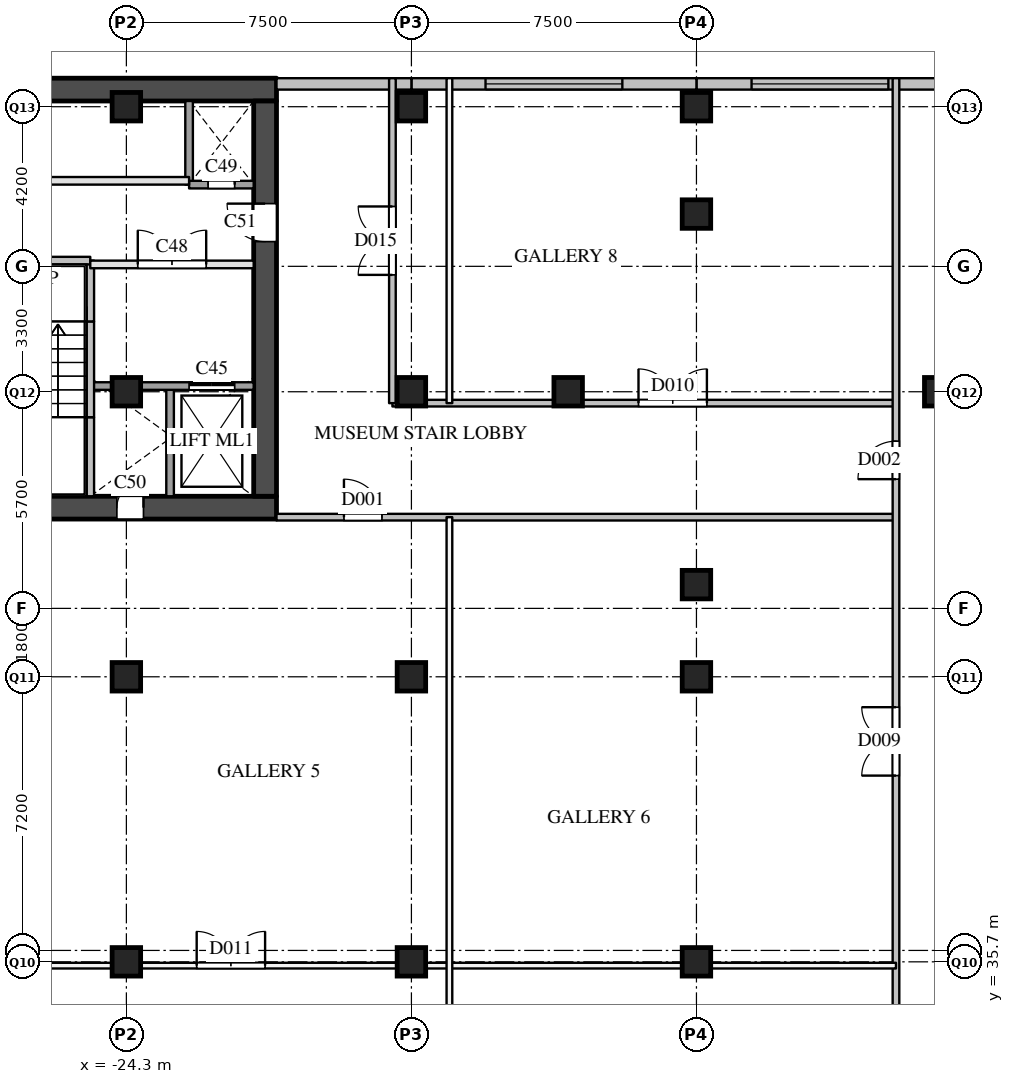
"""IFC4 building model, lengths in metres.
Left out: names, types, materials, properties, quantities, classifications, styles, units other than length and angle.
Written with IfcOpenShell. Run it as: python <this file> out.ifc"""

import sys

from ifc_helpers import new_model, si_unit, direction, frame, frame_2d, origin, origin_2d, place, context, subcontext, project, spatial, rectangle, extrude, element, fill, save


model = new_model("IFC4")
c1 = context("Model", 3, precision=1e-05, world=origin(), true_north=direction((0.0, 1.0)))
c2 = subcontext(c1, "Body", "Model", "MODEL_VIEW")
j1 = project(units=[si_unit("LENGTHUNIT", "METRE"), si_unit("PLANEANGLEUNIT", "RADIAN")], contexts=[c1])
p1 = place(None, origin())
s1 = spatial("IfcSite", under=j1, at=p1, CompositionType="ELEMENT")
p2 = place(p1, origin())
s2 = spatial("IfcBuilding", under=s1, at=p2, CompositionType="ELEMENT")
p3 = place(p2, frame((0.0, 0.0, 21.0)))
s3 = spatial("IfcBuildingStorey", under=s2, at=p3, CompositionType="ELEMENT", Elevation=21.0)
for number, where, z_axis, x_axis in (
    (1, (-24.3, 35.7, 0.0), (0.0, 0.0, 1.0), (1.0, 0.0, 0.0)),
    (2, (-24.3, 43.2, 0.0), (0.0, 0.0, 1.0), (1.0, 0.0, 0.0)),
    (3, (-24.3, 50.7, 0.0), (0.0, 0.0, 1.0), (1.0, 0.0, 0.0)),
    (4, (-24.3, 58.2, 0.0), (0.0, 0.0, 1.0), (1.0, 0.0, 0.0)),
    (5, (-16.8, 35.7, 0.0), (0.0, 0.0, 1.0), (1.0, 0.0, 0.0)),
    (6, (-16.8, 43.2, 0.0), (0.0, 0.0, 1.0), (1.0, 0.0, 0.0)),
    (7, (-16.8, 50.7, 0.0), (0.0, 0.0, 1.0), (1.0, 0.0, 0.0)),
    (8, (-16.8, 58.2, 0.0), (0.0, 0.0, 1.0), (1.0, 0.0, 0.0)),
    (9, (-9.3, 35.7, 0.0), (0.0, 0.0, 1.0), (1.0, 0.0, 0.0)),
    (10, (-9.3, 43.2, 0.0), (0.0, 0.0, 1.0), (1.0, 0.0, 0.0)),
    (11, (-9.3, 58.2, 0.0), (0.0, 0.0, 1.0), (1.0, 0.0, 0.0)),
    (12, (-12.675, 50.7, 0.0), (0.0, 0.0, 1.0), (1.0, 0.0, 0.0)),
    (13, (-9.3, 45.625, 0.0), (0.0, 0.0, 1.0), (1.0, 0.0, 0.0)),
    (14, (-9.3, 55.375, 0.0), (0.0, 0.0, 1.0), (1.0, 0.0, 0.0)),
    (15, (-2.925, 50.7, 0.0), (0.0, 0.0, 1.0), (1.0, 0.0, 0.0)),
):
    element("IfcColumn", number, at=place(p3, frame(where, z_axis=z_axis, x_axis=x_axis)), inside=s3, PredefinedType="COLUMN", context=c2, shape_type="SweptSolid", body=[
        extrude(rectangle(XDim=0.75, YDim=0.75, at=origin_2d()), origin(), (0.0, 0.0, 1.0), 5.0),
    ])
p4 = place(p3, frame((-1.8, 58.8, 0.0), z_axis=(0.0, 0.0, 1.0), x_axis=(-1.0, 0.0, 0.0)))
e16 = element("IfcWall", 16, at=p4, inside=s3, PredefinedType="SOLIDWALL", context=c2, shape_type="SweptSolid", body=[
    extrude(rectangle(XDim=7.5, YDim=0.3, at=frame_2d((3.75, 0.0))), origin(), (0.0, 0.0, 1.0), 4.59),
])
p5 = place(p4, frame((2.45, 0.0, 2.4)))
e17 = element("IfcOpeningElement", 17, at=p5, cuts=e16, PredefinedType="OPENING", context=c2, shape_type="SweptSolid", body=[
    extrude(rectangle(XDim=3.6, YDim=1.2, at=frame_2d((1.8, 0.6))), frame((0.0, 0.16, 0.0), z_axis=(0.0, -1.0, 0.0), x_axis=(1.0, 0.0, 0.0)), (0.0, 0.0, 1.0), 0.32),
])
p6 = place(p3, frame((-9.3, 58.8, 0.0), z_axis=(0.0, 0.0, 1.0), x_axis=(-1.0, 0.0, 0.0)))
e18 = element("IfcWall", 18, at=p6, inside=s3, PredefinedType="SOLIDWALL", context=c2, shape_type="SweptSolid", body=[
    extrude(rectangle(XDim=7.5, YDim=0.3, at=frame_2d((3.75, 0.0))), origin(), (0.0, 0.0, 1.0), 4.59),
])
p7 = place(p6, frame((1.95, 0.0, 2.4)))
e19 = element("IfcOpeningElement", 19, at=p7, cuts=e18, PredefinedType="OPENING", context=c2, shape_type="SweptSolid", body=[
    extrude(rectangle(XDim=3.6, YDim=1.2, at=frame_2d((1.8, 0.6))), frame((0.0, 0.16, 0.0), z_axis=(0.0, -1.0, 0.0), x_axis=(1.0, 0.0, 0.0)), (0.0, 0.0, 1.0), 0.32),
])
p8 = place(p3, frame((-16.8, 58.8, 0.0), z_axis=(0.0, 0.0, 1.0), x_axis=(-1.0, 0.0, 0.0)))
e20 = element("IfcWall", 20, at=p8, inside=s3, PredefinedType="SOLIDWALL", context=c2, shape_type="SweptSolid", body=[
    extrude(rectangle(XDim=3.55, YDim=0.3, at=frame_2d((1.775, 0.0))), origin(), (0.0, 0.0, 1.0), 4.59),
])
p9 = place(p3, frame((-32.55, 47.65, 0.0), z_axis=(0.0, 0.0, 1.0), x_axis=(1.0, 0.0, 0.0)))
e21 = element("IfcWall", 21, at=p9, inside=s3, PredefinedType="SHEAR", context=c2, shape_type="SweptSolid", body=[
    extrude(rectangle(XDim=12.2, YDim=0.6, at=frame_2d((6.1, 0.0))), origin(), (0.0, 0.0, 1.0), 4.55),
])
p10 = place(p9, frame((8.0, 0.0, 0.0)))
e22 = element("IfcOpeningElement", 22, at=p10, cuts=e21, PredefinedType="OPENING", context=c2, shape_type="SweptSolid", body=[
    extrude(rectangle(XDim=0.7, YDim=2.1, at=frame_2d((0.35, 1.05))), frame((0.0, 0.31, 0.0), z_axis=(0.0, -1.0, 0.0), x_axis=(1.0, 0.0, 0.0)), (0.0, 0.0, 1.0), 0.62),
])
p11 = place(p3, frame((-32.55, 58.65, 0.0), z_axis=(0.0, 0.0, 1.0), x_axis=(1.0, 0.0, 0.0)))
e23 = element("IfcWall", 23, at=p11, inside=s3, PredefinedType="SHEAR", context=c2, shape_type="SweptSolid", body=[
    extrude(rectangle(XDim=12.2, YDim=0.6, at=frame_2d((6.1, 0.0))), origin(), (0.0, 0.0, 1.0), 4.55),
])
p12 = place(p3, frame((-20.65, 47.95, 0.0), z_axis=(0.0, 0.0, 1.0), x_axis=(0.0, 1.0, 0.0)))
e24 = element("IfcWall", 24, at=p12, inside=s3, PredefinedType="SHEAR", context=c2, shape_type="SweptSolid", body=[
    extrude(rectangle(XDim=10.4, YDim=0.6, at=frame_2d((5.2, 0.0))), origin(), (0.0, 0.0, 1.0), 4.55),
])
p13 = place(p12, frame((6.7, 0.0, 0.0)))
e25 = element("IfcOpeningElement", 25, at=p13, cuts=e24, PredefinedType="OPENING", context=c2, shape_type="SweptSolid", body=[
    extrude(rectangle(XDim=1.0, YDim=2.1, at=frame_2d((0.5, 1.05))), frame((0.0, 0.31, 0.0), z_axis=(0.0, -1.0, 0.0), x_axis=(1.0, 0.0, 0.0)), (0.0, 0.0, 1.0), 0.62),
])
p14 = place(p3, frame((-25.25, 47.95, 0.0), z_axis=(0.0, 0.0, 1.0), x_axis=(0.0, 1.0, 0.0)))
e26 = element("IfcWall", 26, at=p14, inside=s3, PredefinedType="SOLIDWALL", context=c2, shape_type="SweptSolid", body=[
    extrude(rectangle(XDim=2.08, YDim=0.2, at=frame_2d((1.04, 0.0))), origin(), (0.0, 0.0, 1.0), 4.55),
])
p15 = place(p3, frame((-25.25, 50.03, 0.0), z_axis=(0.0, 0.0, 1.0), x_axis=(0.0, 1.0, 0.0)))
e27 = element("IfcWall", 27, at=p15, inside=s3, PredefinedType="SOLIDWALL", context=c2, shape_type="SweptSolid", body=[
    extrude(rectangle(XDim=2.52, YDim=0.2, at=frame_2d((1.26, 0.0))), origin(), (0.0, 0.0, 1.0), 4.55),
])
p16 = place(p3, frame((-25.25, 52.55, 0.0), z_axis=(0.0, 0.0, 1.0), x_axis=(0.0, 1.0, 0.0)))
e28 = element("IfcWall", 28, at=p16, inside=s3, PredefinedType="SOLIDWALL", context=c2, shape_type="SweptSolid", body=[
    extrude(rectangle(XDim=1.6, YDim=0.2, at=frame_2d((0.8, 0.0))), origin(), (0.0, 0.0, 1.0), 4.55),
])
p17 = place(p3, frame((-23.15, 47.95, 0.0), z_axis=(0.0, 0.0, 1.0), x_axis=(0.0, 1.0, 0.0)))
e29 = element("IfcWall", 29, at=p17, inside=s3, PredefinedType="SOLIDWALL", context=c2, shape_type="SweptSolid", body=[
    extrude(rectangle(XDim=2.9, YDim=0.2, at=frame_2d((1.45, 0.0))), origin(), (0.0, 0.0, 1.0), 4.55),
])
p18 = place(p3, frame((-22.65, 56.15, 0.0), z_axis=(0.0, 0.0, 1.0), x_axis=(0.0, 1.0, 0.0)))
e30 = element("IfcWall", 30, at=p18, inside=s3, PredefinedType="SOLIDWALL", context=c2, shape_type="SweptSolid", body=[
    extrude(rectangle(XDim=2.2, YDim=0.2, at=frame_2d((1.1, 0.0))), origin(), (0.0, 0.0, 1.0), 4.55),
])
p19 = place(p3, frame((-25.25, 50.85, 0.0), z_axis=(0.0, 0.0, 1.0), x_axis=(1.0, 0.0, 0.0)))
e31 = element("IfcWall", 31, at=p19, inside=s3, PredefinedType="SOLIDWALL", context=c2, shape_type="SweptSolid", body=[
    extrude(rectangle(XDim=4.3, YDim=0.2, at=frame_2d((2.15, 0.0))), origin(), (0.0, 0.0, 1.0), 4.55),
])
p20 = place(p19, frame((2.6, 0.0, 0.0)))
e32 = element("IfcOpeningElement", 32, at=p20, cuts=e31, PredefinedType="OPENING", context=c2, shape_type="SweptSolid", body=[
    extrude(rectangle(XDim=1.2, YDim=2.1, at=frame_2d((0.6, 1.05))), frame((0.0, 0.11, 0.0), z_axis=(0.0, -1.0, 0.0), x_axis=(1.0, 0.0, 0.0)), (0.0, 0.0, 1.0), 0.22),
])
p21 = place(p3, frame((-25.25, 54.05, 0.0), z_axis=(0.0, 0.0, 1.0), x_axis=(1.0, 0.0, 0.0)))
e33 = element("IfcWall", 33, at=p21, inside=s3, PredefinedType="PARTITIONING", context=c2, shape_type="SweptSolid", body=[
    extrude(rectangle(XDim=4.3, YDim=0.2, at=frame_2d((2.15, 0.0))), origin(), (0.0, 0.0, 1.0), 4.55),
])
p22 = place(p21, frame((1.25, 0.0, 0.0)))
e34 = element("IfcOpeningElement", 34, at=p22, cuts=e33, PredefinedType="OPENING", context=c2, shape_type="SweptSolid", body=[
    extrude(rectangle(XDim=1.8, YDim=2.1, at=frame_2d((0.9, 1.05))), frame((0.0, 0.11, 0.0), z_axis=(0.0, -1.0, 0.0), x_axis=(1.0, 0.0, 0.0)), (0.0, 0.0, 1.0), 0.22),
])
p23 = place(p3, frame((-28.5, 54.15, 0.0), z_axis=(0.0, 0.0, 1.0), x_axis=(1.0, 0.0, 0.0)))
e35 = element("IfcWall", 35, at=p23, inside=s3, PredefinedType="SOLIDWALL", context=c2, shape_type="SweptSolid", body=[
    extrude(rectangle(XDim=3.25, YDim=0.2, at=frame_2d((1.625, 0.0))), origin(), (0.0, 0.0, 1.0), 4.55),
])
p24 = place(p23, frame((1.025, 0.0, 0.0)))
e36 = element("IfcOpeningElement", 36, at=p24, cuts=e35, PredefinedType="OPENING", context=c2, shape_type="SweptSolid", body=[
    extrude(rectangle(XDim=1.1, YDim=2.1, at=frame_2d((0.55, 1.05))), frame((0.0, 0.11, 0.0), z_axis=(0.0, -1.0, 0.0), x_axis=(1.0, 0.0, 0.0)), (0.0, 0.0, 1.0), 0.22),
])
p25 = place(p3, frame((-31.95, 56.25, 0.0), z_axis=(0.0, 0.0, 1.0), x_axis=(1.0, 0.0, 0.0)))
e37 = element("IfcWall", 37, at=p25, inside=s3, PredefinedType="PARTITIONING", context=c2, shape_type="SweptSolid", body=[
    extrude(rectangle(XDim=9.3, YDim=0.2, at=frame_2d((4.65, 0.0))), origin(), (0.0, 0.0, 1.0), 4.55),
])
p26 = place(p25, frame((4.2, 0.0, 0.0)))
e38 = element("IfcOpeningElement", 38, at=p26, cuts=e37, PredefinedType="OPENING", context=c2, shape_type="SweptSolid", body=[
    extrude(rectangle(XDim=0.9, YDim=2.1, at=frame_2d((0.45, 1.05))), frame((0.0, 0.11, 0.0), z_axis=(0.0, -1.0, 0.0), x_axis=(1.0, 0.0, 0.0)), (0.0, 0.0, 1.0), 0.22),
])
p27 = place(p3, frame((-22.65, 56.15, 0.0), z_axis=(0.0, 0.0, 1.0), x_axis=(1.0, 0.0, 0.0)))
e39 = element("IfcWall", 39, at=p27, inside=s3, PredefinedType="SOLIDWALL", context=c2, shape_type="SweptSolid", body=[
    extrude(rectangle(XDim=1.7, YDim=0.2, at=frame_2d((0.85, 0.0))), origin(), (0.0, 0.0, 1.0), 4.55),
])
p28 = place(p27, frame((0.5, 0.0, 0.0)))
e40 = element("IfcOpeningElement", 40, at=p28, cuts=e39, PredefinedType="OPENING", context=c2, shape_type="SweptSolid", body=[
    extrude(rectangle(XDim=0.7, YDim=2.1, at=frame_2d((0.35, 1.05))), frame((0.0, 0.11, 0.0), z_axis=(0.0, -1.0, 0.0), x_axis=(1.0, 0.0, 0.0)), (0.0, 0.0, 1.0), 0.22),
])
p29 = place(p3, frame((-20.35, 47.4, 0.0), z_axis=(0.0, 0.0, 1.0), x_axis=(1.0, 0.0, 0.0)))
e41 = element("IfcWall", 41, at=p29, inside=s3, PredefinedType="PARTITIONING", context=c2, shape_type="SweptSolid", body=[
    extrude(rectangle(XDim=16.3, YDim=0.175, at=frame_2d((8.15, 0.0))), origin(), (0.0, 0.0, 1.0), 3.79),
])
p30 = place(p29, frame((1.775, 0.0, 0.0)))
e42 = element("IfcOpeningElement", 42, at=p30, cuts=e41, PredefinedType="OPENING", context=c2, shape_type="SweptSolid", body=[
    extrude(rectangle(XDim=1.0, YDim=2.1, at=frame_2d((0.5, 1.05))), frame((0.0, 0.097, 0.0), z_axis=(0.0, -1.0, 0.0), x_axis=(1.0, 0.0, 0.0)), (0.0, 0.0, 1.0), 0.195),
])
p31 = place(p3, frame((-17.3, 50.4, 0.0), z_axis=(0.0, 0.0, 1.0), x_axis=(1.0, 0.0, 0.0)))
e43 = element("IfcWall", 43, at=p31, inside=s3, PredefinedType="PARTITIONING", context=c2, shape_type="SweptSolid", body=[
    extrude(rectangle(XDim=13.25, YDim=0.175, at=frame_2d((6.625, 0.0))), origin(), (0.0, 0.0, 1.0), 4.55),
])
p32 = place(p31, frame((6.475, 0.0, 0.0)))
e44 = element("IfcOpeningElement", 44, at=p32, cuts=e43, PredefinedType="OPENING", context=c2, shape_type="SweptSolid", body=[
    extrude(rectangle(XDim=1.8, YDim=2.1, at=frame_2d((0.9, 1.05))), frame((0.0, 0.097, 0.0), z_axis=(0.0, -1.0, 0.0), x_axis=(1.0, 0.0, 0.0)), (0.0, 0.0, 1.0), 0.195),
])
p33 = place(p3, frame((-17.3, 50.4, 0.0), z_axis=(0.0, 0.0, 1.0), x_axis=(0.0, 1.0, 0.0)))
e45 = element("IfcWall", 45, at=p33, inside=s3, PredefinedType="PARTITIONING", context=c2, shape_type="SweptSolid", body=[
    extrude(rectangle(XDim=8.55, YDim=0.175, at=frame_2d((4.275, 0.0))), origin(), (0.0, 0.0, 1.0), 3.79),
])
p34 = place(p33, frame((3.375, 0.0, 0.0)))
e46 = element("IfcOpeningElement", 46, at=p34, cuts=e45, PredefinedType="OPENING", context=c2, shape_type="SweptSolid", body=[
    extrude(rectangle(XDim=1.8, YDim=2.1, at=frame_2d((0.9, 1.05))), frame((0.0, 0.097, 0.0), z_axis=(0.0, -1.0, 0.0), x_axis=(1.0, 0.0, 0.0)), (0.0, 0.0, 1.0), 0.195),
])
p35 = place(p3, frame((-4.05, -4.05, 0.0), z_axis=(0.0, 0.0, 1.0), x_axis=(0.0, 1.0, 0.0)))
e47 = element("IfcWall", 47, at=p35, inside=s3, PredefinedType="PARTITIONING", context=c2, shape_type="SweptSolid", body=[
    extrude(rectangle(XDim=63.0, YDim=0.175, at=frame_2d((31.5, 0.0))), origin(), (0.0, 0.0, 1.0), 3.79),
])
p36 = place(p35, frame((52.45, 0.0, 0.0)))
e48 = element("IfcOpeningElement", 48, at=p36, cuts=e47, PredefinedType="OPENING", context=c2, shape_type="SweptSolid", body=[
    extrude(rectangle(XDim=1.0, YDim=2.1, at=frame_2d((0.5, 1.05))), frame((0.0, 0.097, 0.0), z_axis=(0.0, -1.0, 0.0), x_axis=(1.0, 0.0, 0.0)), (0.0, 0.0, 1.0), 0.195),
])
p37 = place(p35, frame((7.525, 0.0, 0.0)))
e49 = element("IfcOpeningElement", 49, at=p37, cuts=e47, PredefinedType="OPENING", context=c2, shape_type="SweptSolid", body=[
    extrude(rectangle(XDim=1.0, YDim=2.1, at=frame_2d((0.5, 1.05))), frame((0.0, 0.097, 0.0), z_axis=(0.0, -1.0, 0.0), x_axis=(1.0, 0.0, 0.0)), (0.0, 0.0, 1.0), 0.195),
])
p38 = place(p35, frame((21.05, 0.0, 0.0)))
e50 = element("IfcOpeningElement", 50, at=p38, cuts=e47, PredefinedType="OPENING", context=c2, shape_type="SweptSolid", body=[
    extrude(rectangle(XDim=1.8, YDim=2.1, at=frame_2d((0.9, 1.05))), frame((0.0, 0.097, 0.0), z_axis=(0.0, -1.0, 0.0), x_axis=(1.0, 0.0, 0.0)), (0.0, 0.0, 1.0), 0.195),
])
p39 = place(p35, frame((32.85, 0.0, 0.0)))
e51 = element("IfcOpeningElement", 51, at=p39, cuts=e47, PredefinedType="OPENING", context=c2, shape_type="SweptSolid", body=[
    extrude(rectangle(XDim=1.8, YDim=2.1, at=frame_2d((0.9, 1.05))), frame((0.0, 0.097, 0.0), z_axis=(0.0, -1.0, 0.0), x_axis=(1.0, 0.0, 0.0)), (0.0, 0.0, 1.0), 0.195),
])
p40 = place(p35, frame((44.65, 0.0, 0.0)))
e52 = element("IfcOpeningElement", 52, at=p40, cuts=e47, PredefinedType="OPENING", context=c2, shape_type="SweptSolid", body=[
    extrude(rectangle(XDim=1.8, YDim=2.1, at=frame_2d((0.9, 1.05))), frame((0.0, 0.097, 0.0), z_axis=(0.0, -1.0, 0.0), x_axis=(1.0, 0.0, 0.0)), (0.0, 0.0, 1.0), 0.195),
])
p41 = place(p3, frame((-27.3, 35.6, 0.0), z_axis=(0.0, 0.0, 1.0), x_axis=(1.0, 0.0, 0.0)))
e53 = element("IfcWall", 53, at=p41, inside=s3, PredefinedType="PARTITIONING", context=c2, shape_type="SweptSolid", body=[
    extrude(rectangle(XDim=23.25, YDim=0.15, at=frame_2d((11.625, 0.0))), origin(), (0.0, 0.0, 1.0), 3.79),
])
p42 = place(p41, frame((4.85, 0.0, 0.0)))
e54 = element("IfcOpeningElement", 54, at=p42, cuts=e53, PredefinedType="OPENING", context=c2, shape_type="SweptSolid", body=[
    extrude(rectangle(XDim=1.8, YDim=2.1, at=frame_2d((0.9, 1.05))), frame((0.0, 0.085, 0.0), z_axis=(0.0, -1.0, 0.0), x_axis=(1.0, 0.0, 0.0)), (0.0, 0.0, 1.0), 0.17),
])
p43 = place(p3, frame((-15.8, 30.0, 0.0), z_axis=(0.0, 0.0, 1.0), x_axis=(0.0, 1.0, 0.0)))
e55 = element("IfcWall", 55, at=p43, inside=s3, PredefinedType="PARTITIONING", context=c2, shape_type="SweptSolid", body=[
    extrude(rectangle(XDim=17.4, YDim=0.15, at=frame_2d((8.7, 0.0))), origin(), (0.0, 0.0, 1.0), 3.79),
])
p44 = place(p3, frame((-15.8, 50.4, 0.0), z_axis=(0.0, 0.0, 1.0), x_axis=(0.0, 1.0, 0.0)))
e56 = element("IfcWall", 56, at=p44, inside=s3, PredefinedType="PARTITIONING", context=c2, shape_type="SweptSolid", body=[
    extrude(rectangle(XDim=8.55, YDim=0.15, at=frame_2d((4.275, 0.0))), origin(), (0.0, 0.0, 1.0), 3.79),
])
p45 = place(p5, origin())
e57 = element("IfcWindow", 57, at=p45, inside=s3, PartitioningType="SINGLE_PANEL", PredefinedType="WINDOW", context=c2, shape_type="SweptSolid", body=[
    extrude(rectangle(XDim=3.6, YDim=1.2, at=frame_2d((1.8, 0.6))), frame((0.0, 0.03, 0.0), z_axis=(0.0, -1.0, 0.0), x_axis=(1.0, 0.0, 0.0)), (0.0, 0.0, 1.0), 0.06),
])
fill(e17, e57)
p46 = place(p7, origin())
e58 = element("IfcWindow", 58, at=p46, inside=s3, PartitioningType="SINGLE_PANEL", PredefinedType="WINDOW", context=c2, shape_type="SweptSolid", body=[
    extrude(rectangle(XDim=3.6, YDim=1.2, at=frame_2d((1.8, 0.6))), frame((0.0, 0.03, 0.0), z_axis=(0.0, -1.0, 0.0), x_axis=(1.0, 0.0, 0.0)), (0.0, 0.0, 1.0), 0.06),
])
fill(e19, e58)
p47 = place(p20, origin())
e59 = element("IfcDoor", 59, at=p47, inside=s3, OperationType="SLIDING_TO_LEFT", PredefinedType="DOOR", context=c2, shape_type="SweptSolid", body=[
    extrude(rectangle(XDim=1.2, YDim=2.1, at=frame_2d((0.6, 1.05))), frame((0.0, 0.025, 0.0), z_axis=(0.0, -1.0, 0.0), x_axis=(1.0, 0.0, 0.0)), (0.0, 0.0, 1.0), 0.05),
])
fill(e32, e59)
p48 = place(p22, origin())
e60 = element("IfcDoor", 60, at=p48, inside=s3, OperationType="DOUBLE_DOOR_SINGLE_SWING", PredefinedType="DOOR", context=c2, shape_type="SweptSolid", body=[
    extrude(rectangle(XDim=1.8, YDim=2.1, at=frame_2d((0.9, 1.05))), frame((0.0, 0.025, 0.0), z_axis=(0.0, -1.0, 0.0), x_axis=(1.0, 0.0, 0.0)), (0.0, 0.0, 1.0), 0.05),
])
fill(e34, e60)
p49 = place(p28, origin())
e61 = element("IfcDoor", 61, at=p49, inside=s3, OperationType="SINGLE_SWING_RIGHT", PredefinedType="DOOR", context=c2, shape_type="SweptSolid", body=[
    extrude(rectangle(XDim=0.7, YDim=2.1, at=frame_2d((0.35, 1.05))), frame((0.0, 0.025, 0.0), z_axis=(0.0, -1.0, 0.0), x_axis=(1.0, 0.0, 0.0)), (0.0, 0.0, 1.0), 0.05),
])
fill(e40, e61)
p50 = place(p10, origin())
e62 = element("IfcDoor", 62, at=p50, inside=s3, OperationType="SINGLE_SWING_RIGHT", PredefinedType="DOOR", context=c2, shape_type="SweptSolid", body=[
    extrude(rectangle(XDim=0.7, YDim=2.1, at=frame_2d((0.35, 1.05))), frame((0.0, 0.025, 0.0), z_axis=(0.0, -1.0, 0.0), x_axis=(1.0, 0.0, 0.0)), (0.0, 0.0, 1.0), 0.05),
])
fill(e22, e62)
p51 = place(p13, origin())
e63 = element("IfcDoor", 63, at=p51, inside=s3, OperationType="SINGLE_SWING_RIGHT", PredefinedType="DOOR", context=c2, shape_type="SweptSolid", body=[
    extrude(rectangle(XDim=1.0, YDim=2.1, at=frame_2d((0.5, 1.05))), frame((0.0, 0.025, 0.0), z_axis=(0.0, -1.0, 0.0), x_axis=(1.0, 0.0, 0.0)), (0.0, 0.0, 1.0), 0.05),
])
fill(e25, e63)
p52 = place(p30, origin())
e64 = element("IfcDoor", 64, at=p52, inside=s3, OperationType="SINGLE_SWING_LEFT", PredefinedType="DOOR", context=c2, shape_type="SweptSolid", body=[
    extrude(rectangle(XDim=1.0, YDim=2.1, at=frame_2d((0.5, 1.05))), frame((0.0, 0.025, 0.0), z_axis=(0.0, -1.0, 0.0), x_axis=(1.0, 0.0, 0.0)), (0.0, 0.0, 1.0), 0.05),
])
fill(e42, e64)
p53 = place(p36, origin())
e65 = element("IfcDoor", 65, at=p53, inside=s3, OperationType="SINGLE_SWING_LEFT", PredefinedType="DOOR", context=c2, shape_type="SweptSolid", body=[
    extrude(rectangle(XDim=1.0, YDim=2.1, at=frame_2d((0.5, 1.05))), frame((0.0, 0.025, 0.0), z_axis=(0.0, -1.0, 0.0), x_axis=(1.0, 0.0, 0.0)), (0.0, 0.0, 1.0), 0.05),
])
fill(e48, e65)
p54 = place(p40, origin())
e66 = element("IfcDoor", 66, at=p54, inside=s3, OperationType="DOUBLE_DOOR_SINGLE_SWING", PredefinedType="DOOR", context=c2, shape_type="SweptSolid", body=[
    extrude(rectangle(XDim=1.8, YDim=2.1, at=frame_2d((0.9, 1.05))), frame((0.0, 0.025, 0.0), z_axis=(0.0, -1.0, 0.0), x_axis=(1.0, 0.0, 0.0)), (0.0, 0.0, 1.0), 0.05),
])
fill(e52, e66)
p55 = place(p32, origin())
e67 = element("IfcDoor", 67, at=p55, inside=s3, OperationType="DOUBLE_DOOR_SINGLE_SWING", PredefinedType="DOOR", context=c2, shape_type="SweptSolid", body=[
    extrude(rectangle(XDim=1.8, YDim=2.1, at=frame_2d((0.9, 1.05))), frame((0.0, 0.025, 0.0), z_axis=(0.0, -1.0, 0.0), x_axis=(1.0, 0.0, 0.0)), (0.0, 0.0, 1.0), 0.05),
])
fill(e44, e67)
p56 = place(p42, origin())
e68 = element("IfcDoor", 68, at=p56, inside=s3, OperationType="DOUBLE_DOOR_SINGLE_SWING", PredefinedType="DOOR", context=c2, shape_type="SweptSolid", body=[
    extrude(rectangle(XDim=1.8, YDim=2.1, at=frame_2d((0.9, 1.05))), frame((0.0, 0.025, 0.0), z_axis=(0.0, -1.0, 0.0), x_axis=(1.0, 0.0, 0.0)), (0.0, 0.0, 1.0), 0.05),
])
fill(e54, e68)
p57 = place(p34, origin())
e69 = element("IfcDoor", 69, at=p57, inside=s3, OperationType="DOUBLE_DOOR_SINGLE_SWING", PredefinedType="DOOR", context=c2, shape_type="SweptSolid", body=[
    extrude(rectangle(XDim=1.8, YDim=2.1, at=frame_2d((0.9, 1.05))), frame((0.0, 0.025, 0.0), z_axis=(0.0, -1.0, 0.0), x_axis=(1.0, 0.0, 0.0)), (0.0, 0.0, 1.0), 0.05),
])
fill(e46, e69)
save(model, sys.argv[1])
